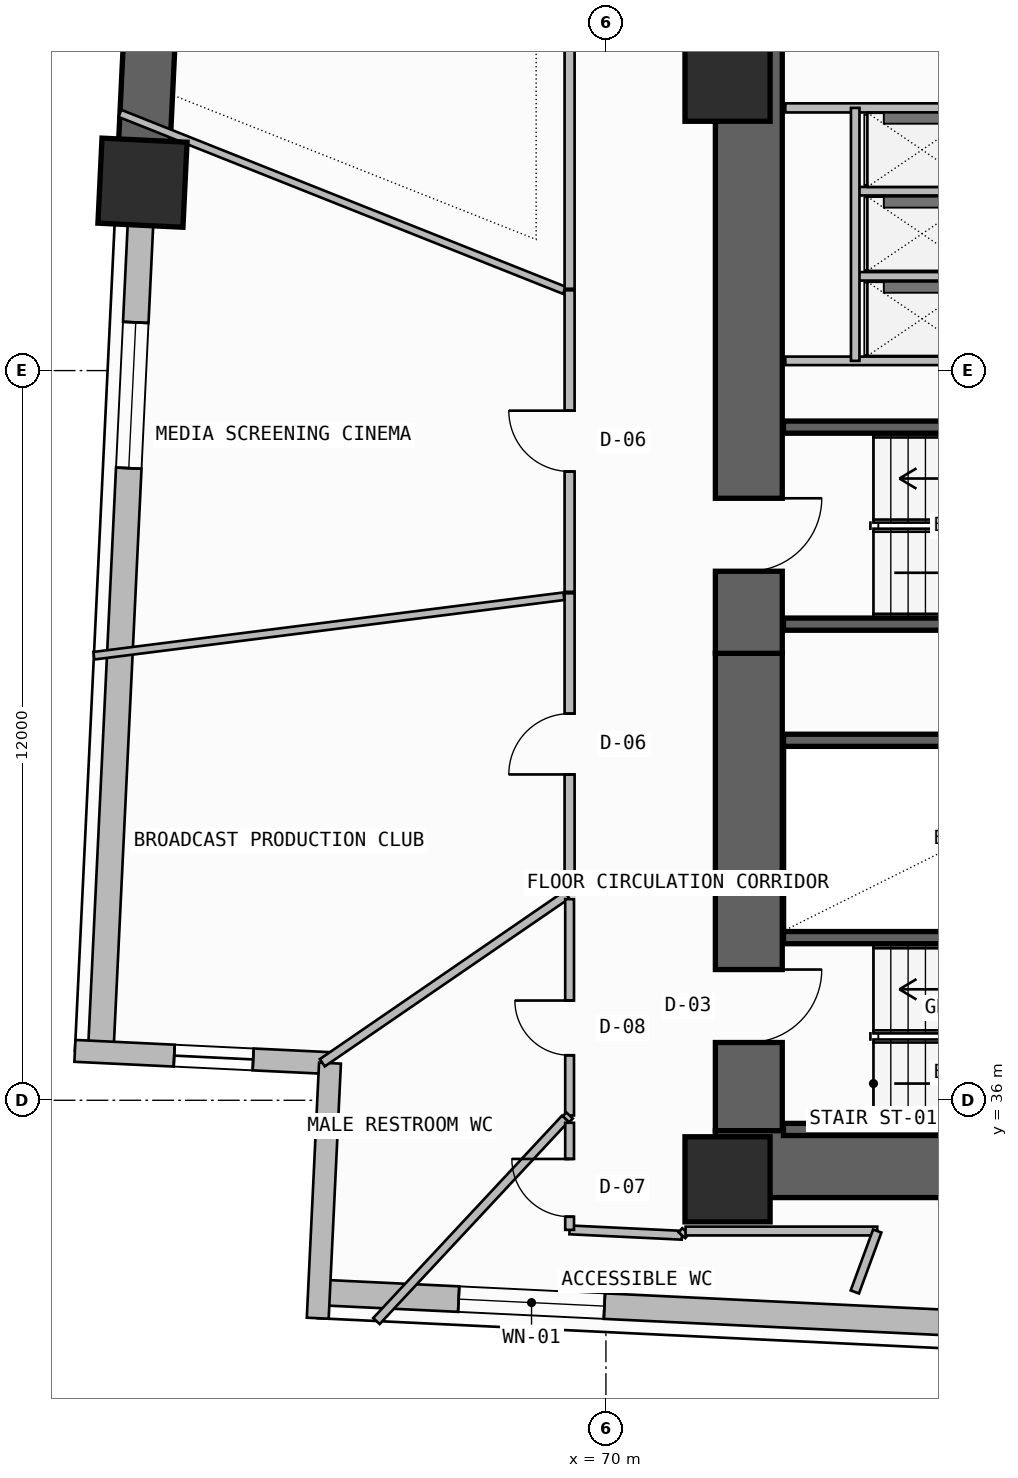
"""IFC4 building model, lengths in metres.
Left out: names, types, materials, properties, quantities, classifications, styles, units other than length and angle.
Written with IfcOpenShell. Run it as: python <this file> out.ifc"""

import sys

from ifc_helpers import new_model, si_unit, direction, frame, frame_2d, origin, origin_2d, place, context, subcontext, project, spatial, rectangle, extrude, element, fill, save


model = new_model("IFC4")
c1 = context("Model", 3, precision=1e-05, world=origin(), true_north=direction((0.0, 1.0)))
c2 = subcontext(c1, "Body", "Model", "MODEL_VIEW")
j1 = project(units=[si_unit("LENGTHUNIT", "METRE"), si_unit("PLANEANGLEUNIT", "RADIAN")], contexts=[c1])
p1 = place(None, origin())
s1 = spatial("IfcSite", under=j1, at=p1, CompositionType="ELEMENT")
p2 = place(p1, origin())
s2 = spatial("IfcBuilding", under=s1, at=p2, CompositionType="ELEMENT")
p3 = place(p2, frame((0.0, 0.0, 51.9)))
s3 = spatial("IfcBuildingStorey", under=s2, at=p3, CompositionType="ELEMENT", Elevation=51.9)
p4 = place(p3, frame((72.35, 35.5, -0.2), z_axis=(0.0, 0.0, 1.0), x_axis=(0.0, 1.0, 0.0)))
e1 = element("IfcWall", 1, at=p4, inside=s3, PredefinedType="SHEAR", context=c2, shape_type="SweptSolid", body=[
    extrude(rectangle(XDim=7.85, YDim=1.1, at=frame_2d((3.925, 0.0))), origin(), (0.0, 0.0, 1.0), 3.6),
])
p5 = place(p4, frame((1.45, 0.0, 0.2)))
e2 = element("IfcOpeningElement", 2, at=p5, cuts=e1, PredefinedType="OPENING", context=c2, shape_type="SweptSolid", body=[
    extrude(rectangle(XDim=1.2, YDim=2.2, at=frame_2d((0.6, 1.1))), frame((0.0, 0.56, 0.0), z_axis=(0.0, -1.0, 0.0), x_axis=(1.0, 0.0, 0.0)), (0.0, 0.0, 1.0), 1.12),
])
p6 = place(p3, frame((71.8, 34.95, -0.2), z_axis=(0.0, 0.0, 1.0), x_axis=(1.0, 0.0, 0.0)))
e3 = element("IfcWall", 3, at=p6, inside=s3, PredefinedType="SHEAR", context=c2, shape_type="SweptSolid", body=[
    extrude(rectangle(XDim=14.3, YDim=1.1, at=frame_2d((7.15, 0.0))), origin(), (0.0, 0.0, 1.0), 3.6),
])
p7 = place(p3, frame((72.35, 43.35, -0.2), z_axis=(0.0, 0.0, 1.0), x_axis=(0.0, 1.0, 0.0)))
e4 = element("IfcWall", 4, at=p7, inside=s3, PredefinedType="SHEAR", context=c2, shape_type="SweptSolid", body=[
    extrude(rectangle(XDim=12.7, YDim=1.1, at=frame_2d((6.35, 0.0))), origin(), (0.0, 0.0, 1.0), 3.6),
])
p8 = place(p7, frame((1.35, 0.0, 0.2)))
e5 = element("IfcOpeningElement", 5, at=p8, cuts=e4, PredefinedType="OPENING", context=c2, shape_type="SweptSolid", body=[
    extrude(rectangle(XDim=1.2, YDim=2.2, at=frame_2d((0.6, 1.1))), frame((0.0, 0.56, 0.0), z_axis=(0.0, -1.0, 0.0), x_axis=(1.0, 0.0, 0.0)), (0.0, 0.0, 1.0), 1.12),
])
for number, where, z_axis, x_axis in (
    (6, (72.0, 34.7, 0.0), (0.0, 0.0, 1.0), (1.0, 0.0, 0.0)),
    (7, (72.0, 52.8, 0.0), (0.0, 0.0, 1.0), (1.0, 0.0, 0.0)),
    (8, (62.378, 51.09, 0.0), (0.0, 0.0, 1.0), (0.048, 0.999, 0.0)),
):
    element("IfcColumn", number, at=place(p3, frame(where, z_axis=z_axis, x_axis=x_axis)), inside=s3, PredefinedType="COLUMN", context=c2, shape_type="SweptSolid", body=[
        extrude(rectangle(XDim=1.4, YDim=1.4, at=origin_2d()), origin(), (0.0, 0.0, 1.0), 3.6),
    ])
p9 = place(p3, frame((65.281, 32.841, 0.0), z_axis=(0.0, 0.0, 1.0), x_axis=(0.998848298084, -0.047979968897, 0.0)))
e9 = element("IfcWall", 9, at=p9, inside=s3, PredefinedType="SOLIDWALL", context=c2, shape_type="SweptSolid", body=[
    extrude(rectangle(XDim=17.952, YDim=0.42, at=frame_2d((8.976, 0.0))), origin(), (0.0, 0.0, 1.0), 2.385),
])
p10 = place(p9, frame((2.3, 0.0, 1.2)))
e10 = element("IfcOpeningElement", 10, at=p10, cuts=e9, PredefinedType="OPENING", context=c2, shape_type="SweptSolid", body=[
    extrude(rectangle(XDim=2.4, YDim=0.9, at=frame_2d((1.2, 0.45))), frame((0.0, 0.22, 0.0), z_axis=(0.0, -1.0, 0.0), x_axis=(1.0, 0.0, 0.0)), (0.0, 0.0, 1.0), 0.44),
])
p11 = place(p3, frame((63.428, 72.957, -0.2), z_axis=(0.0, 0.0, 1.0), x_axis=(-0.047976309476, -0.998848473858, 0.0)))
e11 = element("IfcWall", 11, at=p11, inside=s3, PredefinedType="SHEAR", context=c2, shape_type="SweptSolid", body=[
    extrude(rectangle(XDim=21.892, YDim=0.85, at=frame_2d((10.946, 0.0))), origin(), (0.0, 0.0, 1.0), 3.6),
])
p12 = place(p3, frame((62.378, 51.09, 0.0), z_axis=(0.0, 0.0, 1.0), x_axis=(-0.047978424452, -0.99884837227, 0.0)))
e12 = element("IfcWall", 12, at=p12, inside=s3, PredefinedType="SOLIDWALL", context=c2, shape_type="SweptSolid", body=[
    extrude(rectangle(XDim=14.314, YDim=0.42, at=frame_2d((7.157, 0.0))), origin(), (0.0, 0.0, 1.0), 2.385),
])
p13 = place(p12, frame((2.3, 0.0, 1.2)))
e13 = element("IfcOpeningElement", 13, at=p13, cuts=e12, PredefinedType="OPENING", context=c2, shape_type="SweptSolid", body=[
    extrude(rectangle(XDim=2.4, YDim=0.9, at=frame_2d((1.2, 0.45))), frame((0.0, 0.22, 0.0), z_axis=(0.0, -1.0, 0.0), x_axis=(1.0, 0.0, 0.0)), (0.0, 0.0, 1.0), 0.44),
])
p14 = place(p3, frame((61.267, 36.812, 0.0), z_axis=(0.0, 0.0, 1.0), x_axis=(0.998849519138, -0.047954542207, 0.0)))
e14 = element("IfcWall", 14, at=p14, inside=s3, PredefinedType="SOLIDWALL", context=c2, shape_type="SweptSolid", body=[
    extrude(rectangle(XDim=4.2, YDim=0.36, at=frame_2d((2.1, 0.0))), origin(), (0.0, 0.0, 1.0), 3.4),
])
p15 = place(p14, frame((1.635, 0.0, 0.45)))
e15 = element("IfcOpeningElement", 15, at=p15, cuts=e14, PredefinedType="OPENING", context=c2, shape_type="SweptSolid", body=[
    extrude(rectangle(XDim=1.3, YDim=2.4, at=frame_2d((0.65, 1.2))), frame((0.0, 0.19, 0.0), z_axis=(0.0, -1.0, 0.0), x_axis=(1.0, 0.0, 0.0)), (0.0, 0.0, 1.0), 0.38),
])
p16 = place(p3, frame((65.462, 36.611, 0.0), z_axis=(0.0, 0.0, 1.0), x_axis=(-0.048015322758, -0.998846599224, 0.0)))
e16 = element("IfcWall", 16, at=p16, inside=s3, PredefinedType="SOLIDWALL", context=c2, shape_type="SweptSolid", body=[
    extrude(rectangle(XDim=4.2, YDim=0.36, at=frame_2d((2.1, 0.0))), origin(), (0.0, 0.0, 1.0), 3.4),
])
for number, where, z_axis, x_axis in (
    (17, (72.92, 35.52, -0.2), (0.0, 0.0, 1.0), (1.0, 0.0, 0.0)),
    (18, (72.92, 38.675, -0.2), (0.0, 0.0, 1.0), (1.0, 0.0, 0.0)),
):
    element("IfcWall", number, at=place(p3, frame(where, z_axis=z_axis, x_axis=x_axis)), inside=s3, PredefinedType="SOLIDWALL", context=c2, shape_type="SweptSolid", body=[
        extrude(rectangle(XDim=7.7, YDim=0.2, at=frame_2d((3.85, 0.0))), origin(), (0.0, 0.0, 1.0), 3.6),
    ])
p17 = place(p3, frame((72.92, 41.92, -0.2), z_axis=(0.0, 0.0, 1.0), x_axis=(1.0, 0.0, 0.0)))
e19 = element("IfcWall", 19, at=p17, inside=s3, PredefinedType="SOLIDWALL", context=c2, shape_type="SweptSolid", body=[
    extrude(rectangle(XDim=7.58, YDim=0.2, at=frame_2d((3.79, 0.0))), origin(), (0.0, 0.0, 1.0), 3.6),
])
for number, where, z_axis, x_axis in (
    (20, (72.92, 43.83, -0.2), (0.0, 0.0, 1.0), (1.0, 0.0, 0.0)),
    (21, (72.92, 47.07, -0.2), (0.0, 0.0, 1.0), (1.0, 0.0, 0.0)),
):
    element("IfcWall", number, at=place(p3, frame(where, z_axis=z_axis, x_axis=x_axis)), inside=s3, PredefinedType="SOLIDWALL", context=c2, shape_type="SweptSolid", body=[
        extrude(rectangle(XDim=7.7, YDim=0.2, at=frame_2d((3.85, 0.0))), origin(), (0.0, 0.0, 1.0), 3.6),
    ])
p18 = place(p3, frame((72.95, 52.32, 0.0), z_axis=(0.0, 0.0, 1.0), x_axis=(1.0, 0.0, 0.0)))
e22 = element("IfcWall", 22, at=p18, inside=s3, PredefinedType="SOLIDWALL", context=c2, shape_type="SweptSolid", body=[
    extrude(rectangle(XDim=3.33, YDim=0.15, at=frame_2d((1.665, 0.0))), origin(), (0.0, 0.0, 1.0), 3.4),
])
p19 = place(p3, frame((72.95, 48.16, 0.0), z_axis=(0.0, 0.0, 1.0), x_axis=(1.0, 0.0, 0.0)))
e23 = element("IfcWall", 23, at=p19, inside=s3, PredefinedType="PLUMBINGWALL", context=c2, shape_type="SweptSolid", body=[
    extrude(rectangle(XDim=3.24, YDim=0.14, at=frame_2d((1.62, 0.0))), origin(), (0.0, 0.0, 1.0), 3.4),
])
for number, where, z_axis, x_axis in (
    (24, (74.15, 49.55, 0.0), (0.0, 0.0, 1.0), (1.0, 0.0, 0.0)),
    (25, (74.15, 50.95, 0.0), (0.0, 0.0, 1.0), (1.0, 0.0, 0.0)),
):
    element("IfcWall", number, at=place(p3, frame(where, z_axis=z_axis, x_axis=x_axis)), inside=s3, PredefinedType="PLUMBINGWALL", context=c2, shape_type="SweptSolid", body=[
        extrude(rectangle(XDim=2.04, YDim=0.14, at=frame_2d((1.02, 0.0))), origin(), (0.0, 0.0, 1.0), 3.4),
    ])
p20 = place(p3, frame((74.1, 48.16, 0.0), z_axis=(0.0, 0.0, 1.0), x_axis=(0.0, 1.0, 0.0)))
e26 = element("IfcWall", 26, at=p20, inside=s3, PredefinedType="PLUMBINGWALL", context=c2, shape_type="SweptSolid", body=[
    extrude(rectangle(XDim=4.16, YDim=0.14, at=frame_2d((2.08, 0.0))), origin(), (0.0, 0.0, 1.0), 3.4),
])
p21 = place(p3, frame((69.403, 44.337, 0.0), z_axis=(0.0, 0.0, 1.0), x_axis=(0.0, -1.0, 0.0)))
e27 = element("IfcWall", 27, at=p21, inside=s3, PredefinedType="PARTITIONING", context=c2, shape_type="SweptSolid", body=[
    extrude(rectangle(XDim=4.958, YDim=0.165, at=frame_2d((2.479, 0.0))), origin(), (0.0, 0.0, 1.0), 3.4),
])
p22 = place(p21, frame((1.979, 0.0, 0.0)))
e28 = element("IfcOpeningElement", 28, at=p22, cuts=e27, PredefinedType="OPENING", context=c2, shape_type="SweptSolid", body=[
    extrude(rectangle(XDim=1.0, YDim=2.2, at=frame_2d((0.5, 1.1))), frame((0.0, 0.093, 0.0), z_axis=(0.0, -1.0, 0.0), x_axis=(1.0, 0.0, 0.0)), (0.0, 0.0, 1.0), 0.185),
])
p23 = place(p3, frame((61.579, 43.311, 0.0), z_axis=(0.0, 0.0, 1.0), x_axis=(0.992081396962, 0.125596583563, 0.0)))
e29 = element("IfcWall", 29, at=p23, inside=s3, PredefinedType="PARTITIONING", context=c2, shape_type="SweptSolid", body=[
    extrude(rectangle(XDim=7.791, YDim=0.125, at=frame_2d((3.896, 0.0))), origin(), (0.0, 0.0, 1.0), 3.4),
])
p24 = place(p3, frame((69.357, 39.379, 0.0), z_axis=(0.0, 0.0, 1.0), x_axis=(-0.824310498122, -0.566137971422, 0.0)))
e30 = element("IfcWall", 30, at=p24, inside=s3, PredefinedType="PARTITIONING", context=c2, shape_type="SweptSolid", body=[
    extrude(rectangle(XDim=4.879, YDim=0.145, at=frame_2d((2.439, 0.0))), origin(), (0.0, 0.0, 1.0), 3.4),
])
p25 = place(p3, frame((69.403, 49.32, 0.0), z_axis=(0.0, 0.0, 1.0), x_axis=(0.0, -1.0, 0.0)))
e31 = element("IfcWall", 31, at=p25, inside=s3, PredefinedType="PARTITIONING", context=c2, shape_type="SweptSolid", body=[
    extrude(rectangle(XDim=4.958, YDim=0.165, at=frame_2d((2.479, 0.0))), origin(), (0.0, 0.0, 1.0), 3.4),
])
p26 = place(p25, frame((1.979, 0.0, 0.0)))
e32 = element("IfcOpeningElement", 32, at=p26, cuts=e31, PredefinedType="OPENING", context=c2, shape_type="SweptSolid", body=[
    extrude(rectangle(XDim=1.0, YDim=2.2, at=frame_2d((0.5, 1.1))), frame((0.0, 0.093, 0.0), z_axis=(0.0, -1.0, 0.0), x_axis=(1.0, 0.0, 0.0)), (0.0, 0.0, 1.0), 0.185),
])
p27 = place(p3, frame((62.007, 52.23, 0.0), z_axis=(0.0, 0.0, 1.0), x_axis=(0.929100277446, -0.36982789842, 0.0)))
e33 = element("IfcWall", 33, at=p27, inside=s3, PredefinedType="PARTITIONING", context=c2, shape_type="SweptSolid", body=[
    extrude(rectangle(XDim=7.868, YDim=0.125, at=frame_2d((3.934, 0.0))), origin(), (0.0, 0.0, 1.0), 2.385),
])
p28 = place(p3, frame((69.403, 39.308, 0.0), z_axis=(0.0, 0.0, 1.0), x_axis=(0.0, -1.0, 0.0)))
e34 = element("IfcWall", 34, at=p28, inside=s3, PredefinedType="PARTITIONING", context=c2, shape_type="SweptSolid", body=[
    extrude(rectangle(XDim=3.558, YDim=0.145, at=frame_2d((1.779, 0.0))), origin(), (0.0, 0.0, 1.0), 3.4),
])
p29 = place(p28, frame((1.667, 0.0, 0.0)))
e35 = element("IfcOpeningElement", 35, at=p29, cuts=e34, PredefinedType="OPENING", context=c2, shape_type="SweptSolid", body=[
    extrude(rectangle(XDim=0.9, YDim=2.1, at=frame_2d((0.45, 1.05))), frame((0.0, 0.083, 0.0), z_axis=(0.0, -1.0, 0.0), x_axis=(1.0, 0.0, 0.0)), (0.0, 0.0, 1.0), 0.165),
])
p30 = place(p3, frame((69.403, 35.75, 0.0), z_axis=(0.0, 0.0, 1.0), x_axis=(-0.690075333573, -0.723737544967, 0.0)))
e36 = element("IfcWall", 36, at=p30, inside=s3, PredefinedType="PARTITIONING", context=c2, shape_type="SweptSolid", body=[
    extrude(rectangle(XDim=0.087, YDim=0.145, at=frame_2d((0.043, 0.0))), origin(), (0.0, 0.0, 1.0), 3.4),
])
p31 = place(p3, frame((69.331, 35.698, 0.0), z_axis=(0.0, 0.0, 1.0), x_axis=(-0.682115663915, -0.731244296416, 0.0)))
e37 = element("IfcWall", 37, at=p31, inside=s3, PredefinedType="PARTITIONING", context=c2, shape_type="SweptSolid", body=[
    extrude(rectangle(XDim=4.552, YDim=0.145, at=frame_2d((2.276, 0.0))), origin(), (0.0, 0.0, 1.0), 3.4),
])
p32 = place(p3, frame((69.403, 33.869, 0.0), z_axis=(0.0, 0.0, 1.0), x_axis=(0.998851351877, -0.04791635268, 0.0)))
e38 = element("IfcWall", 38, at=p32, inside=s3, PredefinedType="PARTITIONING", context=c2, shape_type="SweptSolid", body=[
    extrude(rectangle(XDim=1.85, YDim=0.145, at=frame_2d((0.925, 0.0))), origin(), (0.0, 0.0, 1.0), 3.4),
])
p33 = place(p3, frame((69.403, 35.63, 0.0), z_axis=(0.0, 0.0, 1.0), x_axis=(0.0, -1.0, 0.0)))
e39 = element("IfcWall", 39, at=p33, inside=s3, PredefinedType="PARTITIONING", context=c2, shape_type="SweptSolid", body=[
    extrude(rectangle(XDim=1.761, YDim=0.145, at=frame_2d((0.88, 0.0))), origin(), (0.0, 0.0, 1.0), 3.4),
])
p34 = place(p33, frame((0.594, 0.0, 0.0)))
e40 = element("IfcOpeningElement", 40, at=p34, cuts=e39, PredefinedType="OPENING", context=c2, shape_type="SweptSolid", body=[
    extrude(rectangle(XDim=0.95, YDim=2.15, at=frame_2d((0.475, 1.075))), frame((0.0, 0.083, 0.0), z_axis=(0.0, -1.0, 0.0), x_axis=(1.0, 0.0, 0.0)), (0.0, 0.0, 1.0), 0.165),
])
p35 = place(p3, frame((71.25, 33.78, 0.0), z_axis=(0.0, 0.0, 1.0), x_axis=(0.652100218984, 0.758132774916, 0.0)))
e41 = element("IfcWall", 41, at=p35, inside=s3, PredefinedType="PARTITIONING", context=c2, shape_type="SweptSolid", body=[
    extrude(rectangle(XDim=0.092, YDim=0.145, at=frame_2d((0.046, 0.0))), origin(), (0.0, 0.0, 1.0), 3.4),
])
p36 = place(p3, frame((69.403, 58.998, 0.0), z_axis=(0.0, 0.0, 1.0), x_axis=(0.0, -1.0, 0.0)))
e42 = element("IfcWall", 42, at=p36, inside=s3, PredefinedType="PARTITIONING", context=c2, shape_type="SweptSolid", body=[
    extrude(rectangle(XDim=9.652, YDim=0.165, at=frame_2d((4.826, 0.0))), origin(), (0.0, 0.0, 1.0), 2.785),
])
p37 = place(p36, frame((4.326, 0.0, 0.0)))
e43 = element("IfcOpeningElement", 43, at=p37, cuts=e42, PredefinedType="OPENING", context=c2, shape_type="SweptSolid", body=[
    extrude(rectangle(XDim=1.0, YDim=2.2, at=frame_2d((0.5, 1.1))), frame((0.0, 0.093, 0.0), z_axis=(0.0, -1.0, 0.0), x_axis=(1.0, 0.0, 0.0)), (0.0, 0.0, 1.0), 0.185),
])
p38 = place(p3, frame((71.31, 33.85, 0.0), z_axis=(0.0, 0.0, 1.0), x_axis=(1.0, 0.0, 0.0)))
e44 = element("IfcWall", 44, at=p38, inside=s3, PredefinedType="PARTITIONING", context=c2, shape_type="SweptSolid", body=[
    extrude(rectangle(XDim=3.152, YDim=0.145, at=frame_2d((1.576, 0.0))), origin(), (0.0, 0.0, 1.0), 3.4),
])
p39 = place(p3, frame((74.462, 33.85, 0.0), z_axis=(0.0, 0.0, 1.0), x_axis=(-0.345355803619, -0.938471826379, 0.0)))
e45 = element("IfcWall", 45, at=p39, inside=s3, PredefinedType="PARTITIONING", context=c2, shape_type="SweptSolid", body=[
    extrude(rectangle(XDim=1.068, YDim=0.145, at=frame_2d((0.534, 0.0))), origin(), (0.0, 0.0, 1.0), 3.4),
])
p40 = place(p10, origin())
e46 = element("IfcWindow", 46, at=p40, inside=s3, PartitioningType="SINGLE_PANEL", PredefinedType="WINDOW", context=c2, shape_type="SweptSolid", body=[
    extrude(rectangle(XDim=2.4, YDim=0.9, at=frame_2d((1.2, 0.45))), frame((0.0, 0.03, 0.0), z_axis=(0.0, -1.0, 0.0), x_axis=(1.0, 0.0, 0.0)), (0.0, 0.0, 1.0), 0.06),
])
fill(e10, e46)
p41 = place(p13, origin())
e47 = element("IfcWindow", 47, at=p41, inside=s3, PartitioningType="SINGLE_PANEL", PredefinedType="WINDOW", context=c2, shape_type="SweptSolid", body=[
    extrude(rectangle(XDim=2.4, YDim=0.9, at=frame_2d((1.2, 0.45))), frame((0.0, 0.03, 0.0), z_axis=(0.0, -1.0, 0.0), x_axis=(1.0, 0.0, 0.0)), (0.0, 0.0, 1.0), 0.06),
])
fill(e13, e47)
p42 = place(p15, origin())
e48 = element("IfcWindow", 48, at=p42, inside=s3, PartitioningType="SINGLE_PANEL", PredefinedType="WINDOW", context=c2, shape_type="SweptSolid", body=[
    extrude(rectangle(XDim=1.3, YDim=2.4, at=frame_2d((0.65, 1.2))), frame((0.0, 0.03, 0.0), z_axis=(0.0, -1.0, 0.0), x_axis=(1.0, 0.0, 0.0)), (0.0, 0.0, 1.0), 0.06),
])
fill(e15, e48)
p43 = place(p5, frame((1.2, 0.0, 0.0), z_axis=(0.0, 0.0, 1.0), x_axis=(-1.0, 0.0, 0.0)))
e49 = element("IfcDoor", 49, at=p43, inside=s3, OperationType="SINGLE_SWING_LEFT", PredefinedType="USERDEFINED", context=c2, shape_type="SweptSolid", body=[
    extrude(rectangle(XDim=1.2, YDim=2.2, at=frame_2d((0.6, 1.1))), frame((0.0, 0.025, 0.0), z_axis=(0.0, -1.0, 0.0), x_axis=(1.0, 0.0, 0.0)), (0.0, 0.0, 1.0), 0.05),
])
fill(e2, e49)
p44 = place(p8, frame((1.2, 0.0, 0.0), z_axis=(0.0, 0.0, 1.0), x_axis=(-1.0, 0.0, 0.0)))
e50 = element("IfcDoor", 50, at=p44, inside=s3, OperationType="SINGLE_SWING_LEFT", PredefinedType="USERDEFINED", context=c2, shape_type="SweptSolid", body=[
    extrude(rectangle(XDim=1.2, YDim=2.2, at=frame_2d((0.6, 1.1))), frame((0.0, 0.025, 0.0), z_axis=(0.0, -1.0, 0.0), x_axis=(1.0, 0.0, 0.0)), (0.0, 0.0, 1.0), 0.05),
])
fill(e5, e50)
p45 = place(p22, frame((1.0, 0.0, 0.0), z_axis=(0.0, 0.0, 1.0), x_axis=(-1.0, 0.0, 0.0)))
e51 = element("IfcDoor", 51, at=p45, inside=s3, OperationType="SINGLE_SWING_LEFT", PredefinedType="DOOR", context=c2, shape_type="SweptSolid", body=[
    extrude(rectangle(XDim=1.0, YDim=2.2, at=frame_2d((0.5, 1.1))), frame((0.0, 0.025, 0.0), z_axis=(0.0, -1.0, 0.0), x_axis=(1.0, 0.0, 0.0)), (0.0, 0.0, 1.0), 0.05),
])
fill(e28, e51)
p46 = place(p26, frame((1.0, 0.0, 0.0), z_axis=(0.0, 0.0, 1.0), x_axis=(-1.0, 0.0, 0.0)))
e52 = element("IfcDoor", 52, at=p46, inside=s3, OperationType="SINGLE_SWING_RIGHT", PredefinedType="DOOR", context=c2, shape_type="SweptSolid", body=[
    extrude(rectangle(XDim=1.0, YDim=2.2, at=frame_2d((0.5, 1.1))), frame((0.0, 0.025, 0.0), z_axis=(0.0, -1.0, 0.0), x_axis=(1.0, 0.0, 0.0)), (0.0, 0.0, 1.0), 0.05),
])
fill(e32, e52)
p47 = place(p29, frame((0.9, 0.0, 0.0), z_axis=(0.0, 0.0, 1.0), x_axis=(-1.0, 0.0, 0.0)))
e53 = element("IfcDoor", 53, at=p47, inside=s3, OperationType="SINGLE_SWING_RIGHT", PredefinedType="DOOR", context=c2, shape_type="SweptSolid", body=[
    extrude(rectangle(XDim=0.9, YDim=2.1, at=frame_2d((0.45, 1.05))), frame((0.0, 0.025, 0.0), z_axis=(0.0, -1.0, 0.0), x_axis=(1.0, 0.0, 0.0)), (0.0, 0.0, 1.0), 0.05),
])
fill(e35, e53)
p48 = place(p34, frame((0.95, 0.0, 0.0), z_axis=(0.0, 0.0, 1.0), x_axis=(-1.0, 0.0, 0.0)))
e54 = element("IfcDoor", 54, at=p48, inside=s3, OperationType="SINGLE_SWING_RIGHT", PredefinedType="DOOR", context=c2, shape_type="SweptSolid", body=[
    extrude(rectangle(XDim=0.95, YDim=2.15, at=frame_2d((0.475, 1.075))), frame((0.0, 0.025, 0.0), z_axis=(0.0, -1.0, 0.0), x_axis=(1.0, 0.0, 0.0)), (0.0, 0.0, 1.0), 0.05),
])
fill(e40, e54)
save(model, sys.argv[1])
